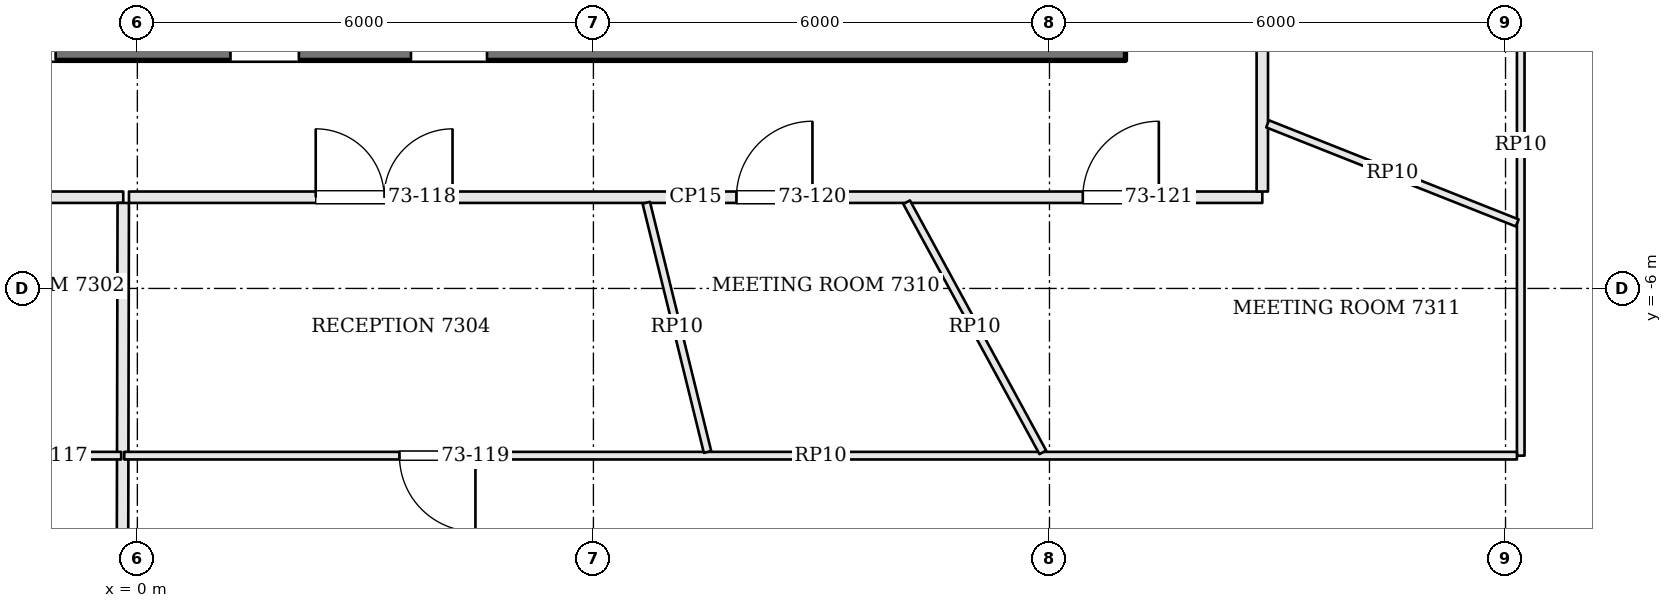
"""IFC4 building model, lengths in metres.
Left out: names, types, materials, properties, quantities, classifications, styles, units other than length and angle.
Written with IfcOpenShell. Run it as: python <this file> out.ifc"""

import sys

from ifc_helpers import new_model, si_unit, direction, frame, frame_2d, origin, place, context, subcontext, project, spatial, rectangle, extrude, element, fill, save


model = new_model("IFC4")
c1 = context("Model", 3, precision=1e-05, world=origin(), true_north=direction((0.0, 1.0)))
c2 = subcontext(c1, "Body", "Model", "MODEL_VIEW")
j1 = project(units=[si_unit("LENGTHUNIT", "METRE"), si_unit("PLANEANGLEUNIT", "RADIAN")], contexts=[c1])
p1 = place(None, origin())
s1 = spatial("IfcSite", under=j1, at=p1, CompositionType="ELEMENT")
p2 = place(p1, origin())
s2 = spatial("IfcBuilding", under=s1, at=p2, CompositionType="ELEMENT")
p3 = place(p2, frame((0.0, 0.0, 296.1)))
s3 = spatial("IfcBuildingStorey", under=s2, at=p3, CompositionType="ELEMENT", Elevation=296.1)
p4 = place(p3, frame((-13.0, -2.6, 0.0), z_axis=(0.0, 0.0, 1.0), x_axis=(1.0, 0.0, 0.0)))
e1 = element("IfcWall", 1, at=p4, inside=s3, PredefinedType="SHEAR", context=c2, shape_type="SweptSolid", body=[
    extrude(rectangle(XDim=26.0, YDim=0.8, at=frame_2d((13.0, 0.0))), origin(), (0.0, 0.0, 1.0), 3.9),
])
p5 = place(p4, frame((8.5, 0.0, 0.0)))
e2 = element("IfcOpeningElement", 2, at=p5, cuts=e1, PredefinedType="OPENING", context=c2, shape_type="SweptSolid", body=[
    extrude(rectangle(XDim=1.0, YDim=2.1, at=frame_2d((0.5, 1.05))), frame((0.0, 0.41, 0.0), z_axis=(0.0, -1.0, 0.0), x_axis=(1.0, 0.0, 0.0)), (0.0, 0.0, 1.0), 0.82),
])
p6 = place(p4, frame((11.025, 0.0, 0.0)))
e3 = element("IfcOpeningElement", 3, at=p6, cuts=e1, PredefinedType="OPENING", context=c2, shape_type="SweptSolid", body=[
    extrude(rectangle(XDim=0.9, YDim=2.1, at=frame_2d((0.45, 1.05))), frame((0.0, 0.41, 0.0), z_axis=(0.0, -1.0, 0.0), x_axis=(1.0, 0.0, 0.0)), (0.0, 0.0, 1.0), 0.82),
])
p7 = place(p4, frame((14.225, 0.0, 0.0)))
e4 = element("IfcOpeningElement", 4, at=p7, cuts=e1, PredefinedType="OPENING", context=c2, shape_type="SweptSolid", body=[
    extrude(rectangle(XDim=0.9, YDim=2.1, at=frame_2d((0.45, 1.05))), frame((0.0, 0.41, 0.0), z_axis=(0.0, -1.0, 0.0), x_axis=(1.0, 0.0, 0.0)), (0.0, 0.0, 1.0), 0.82),
])
p8 = place(p4, frame((16.6, 0.0, 0.0)))
e5 = element("IfcOpeningElement", 5, at=p8, cuts=e1, PredefinedType="OPENING", context=c2, shape_type="SweptSolid", body=[
    extrude(rectangle(XDim=1.0, YDim=2.1, at=frame_2d((0.5, 1.05))), frame((0.0, 0.41, 0.0), z_axis=(0.0, -1.0, 0.0), x_axis=(1.0, 0.0, 0.0)), (0.0, 0.0, 1.0), 0.82),
])
p9 = place(p3, frame((-14.725, -4.8, 0.0), z_axis=(0.0, 0.0, 1.0), x_axis=(1.0, 0.0, 0.0)))
e6 = element("IfcWall", 6, at=p9, inside=s3, PredefinedType="PARTITIONING", context=c2, shape_type="SweptSolid", body=[
    extrude(rectangle(XDim=14.54, YDim=0.15, at=frame_2d((7.27, 0.0))), origin(), (0.0, 0.0, 1.0), 3.198),
])
p10 = place(p9, frame((0.45, 0.0, 0.0)))
e7 = element("IfcOpeningElement", 7, at=p10, cuts=e6, PredefinedType="OPENING", context=c2, shape_type="SweptSolid", body=[
    extrude(rectangle(XDim=1.0, YDim=2.4, at=frame_2d((0.5, 1.2))), frame((0.0, 0.085, 0.0), z_axis=(0.0, -1.0, 0.0), x_axis=(1.0, 0.0, 0.0)), (0.0, 0.0, 1.0), 0.17),
])
p11 = place(p9, frame((3.423, 0.0, 0.0)))
e8 = element("IfcOpeningElement", 8, at=p11, cuts=e6, PredefinedType="OPENING", context=c2, shape_type="SweptSolid", body=[
    extrude(rectangle(XDim=1.0, YDim=2.4, at=frame_2d((0.5, 1.2))), frame((0.0, 0.085, 0.0), z_axis=(0.0, -1.0, 0.0), x_axis=(1.0, 0.0, 0.0)), (0.0, 0.0, 1.0), 0.17),
])
p12 = place(p9, frame((6.014, 0.0, 0.0)))
e9 = element("IfcOpeningElement", 9, at=p12, cuts=e6, PredefinedType="OPENING", context=c2, shape_type="SweptSolid", body=[
    extrude(rectangle(XDim=1.0, YDim=2.4, at=frame_2d((0.5, 1.2))), frame((0.0, 0.085, 0.0), z_axis=(0.0, -1.0, 0.0), x_axis=(1.0, 0.0, 0.0)), (0.0, 0.0, 1.0), 0.17),
])
p13 = place(p3, frame((-0.213, -17.994, 0.0), z_axis=(0.0, 0.0, 1.0), x_axis=(0.002121478031, 0.999997749663, 0.0)))
e10 = element("IfcWall", 10, at=p13, inside=s3, PredefinedType="PARTITIONING", context=c2, shape_type="SweptSolid", body=[
    extrude(rectangle(XDim=13.119, YDim=0.15, at=frame_2d((6.56, 0.0))), origin(), (0.0, 0.0, 1.0), 3.234),
])
p14 = place(p3, frame((-0.11, -4.8, 0.0), z_axis=(0.0, 0.0, 1.0), x_axis=(1.0, 0.0, 0.0)))
e11 = element("IfcWall", 11, at=p14, inside=s3, PredefinedType="PARTITIONING", context=c2, shape_type="SweptSolid", body=[
    extrude(rectangle(XDim=14.91, YDim=0.15, at=frame_2d((7.455, 0.0))), origin(), (0.0, 0.0, 1.0), 3.198),
])
p15 = place(p14, frame((2.457, 0.0, 0.0)))
e12 = element("IfcOpeningElement", 12, at=p15, cuts=e11, PredefinedType="OPENING", context=c2, shape_type="SweptSolid", body=[
    extrude(rectangle(XDim=1.8, YDim=2.1, at=frame_2d((0.9, 1.05))), frame((0.0, 0.085, 0.0), z_axis=(0.0, -1.0, 0.0), x_axis=(1.0, 0.0, 0.0)), (0.0, 0.0, 1.0), 0.17),
])
p16 = place(p14, frame((7.992, 0.0, 0.0)))
e13 = element("IfcOpeningElement", 13, at=p16, cuts=e11, PredefinedType="OPENING", context=c2, shape_type="SweptSolid", body=[
    extrude(rectangle(XDim=1.0, YDim=2.4, at=frame_2d((0.5, 1.2))), frame((0.0, 0.085, 0.0), z_axis=(0.0, -1.0, 0.0), x_axis=(1.0, 0.0, 0.0)), (0.0, 0.0, 1.0), 0.17),
])
p17 = place(p14, frame((12.549, 0.0, 0.0)))
e14 = element("IfcOpeningElement", 14, at=p17, cuts=e11, PredefinedType="OPENING", context=c2, shape_type="SweptSolid", body=[
    extrude(rectangle(XDim=1.0, YDim=2.4, at=frame_2d((0.5, 1.2))), frame((0.0, 0.085, 0.0), z_axis=(0.0, -1.0, 0.0), x_axis=(1.0, 0.0, 0.0)), (0.0, 0.0, 1.0), 0.17),
])
p18 = place(p3, frame((14.8, -4.725, 0.0), z_axis=(0.0, 0.0, 1.0), x_axis=(0.0, 1.0, 0.0)))
e15 = element("IfcWall", 15, at=p18, inside=s3, PredefinedType="PARTITIONING", context=c2, shape_type="SweptSolid", body=[
    extrude(rectangle(XDim=4.698, YDim=0.15, at=frame_2d((2.349, 0.0))), origin(), (0.0, 0.0, 1.0), 3.198),
])
p19 = place(p3, frame((-0.213, -8.2, 0.0), z_axis=(0.0, 0.0, 1.0), x_axis=(-1.0, 0.0, 0.0)))
e16 = element("IfcWall", 16, at=p19, inside=s3, PredefinedType="PARTITIONING", context=c2, shape_type="SweptSolid", body=[
    extrude(rectangle(XDim=17.937, YDim=0.1, at=frame_2d((8.969, 0.0))), origin(), (0.0, 0.0, 1.0), 3.184),
])
p20 = place(p19, frame((4.931, 0.0, 0.0)))
e17 = element("IfcOpeningElement", 17, at=p20, cuts=e16, PredefinedType="OPENING", context=c2, shape_type="SweptSolid", body=[
    extrude(rectangle(XDim=0.9, YDim=2.1, at=frame_2d((0.45, 1.05))), frame((0.0, 0.06, 0.0), z_axis=(0.0, -1.0, 0.0), x_axis=(1.0, 0.0, 0.0)), (0.0, 0.0, 1.0), 0.12),
])
p21 = place(p19, frame((0.938, 0.0, 0.0)))
e18 = element("IfcOpeningElement", 18, at=p21, cuts=e16, PredefinedType="OPENING", context=c2, shape_type="SweptSolid", body=[
    extrude(rectangle(XDim=0.9, YDim=2.1, at=frame_2d((0.45, 1.05))), frame((0.0, 0.06, 0.0), z_axis=(0.0, -1.0, 0.0), x_axis=(1.0, 0.0, 0.0)), (0.0, 0.0, 1.0), 0.12),
])
p22 = place(p3, frame((18.2, -0.029, 0.0), z_axis=(0.0, 0.0, 1.0), x_axis=(0.0, -1.0, 0.0)))
e19 = element("IfcWall", 19, at=p22, inside=s3, PredefinedType="PARTITIONING", context=c2, shape_type="SweptSolid", body=[
    extrude(rectangle(XDim=8.171, YDim=0.1, at=frame_2d((4.085, 0.0))), origin(), (0.0, 0.0, 1.0), 3.184),
])
p23 = place(p22, frame((1.824, 0.0, 0.0)))
e20 = element("IfcOpeningElement", 20, at=p23, cuts=e19, PredefinedType="OPENING", context=c2, shape_type="SweptSolid", body=[
    extrude(rectangle(XDim=0.9, YDim=2.1, at=frame_2d((0.45, 1.05))), frame((0.0, 0.06, 0.0), z_axis=(0.0, -1.0, 0.0), x_axis=(1.0, 0.0, 0.0)), (0.0, 0.0, 1.0), 0.12),
])
p24 = place(p3, frame((18.15, -8.2, 0.0), z_axis=(0.0, 0.0, 1.0), x_axis=(-1.0, 0.0, 0.0)))
e21 = element("IfcWall", 21, at=p24, inside=s3, PredefinedType="PARTITIONING", context=c2, shape_type="SweptSolid", body=[
    extrude(rectangle(XDim=18.323, YDim=0.1, at=frame_2d((9.161, 0.0))), origin(), (0.0, 0.0, 1.0), 3.184),
])
p25 = place(p24, frame((13.702, 0.0, 0.0)))
e22 = element("IfcOpeningElement", 22, at=p25, cuts=e21, PredefinedType="OPENING", context=c2, shape_type="SweptSolid", body=[
    extrude(rectangle(XDim=1.0, YDim=2.1, at=frame_2d((0.5, 1.05))), frame((0.0, 0.06, 0.0), z_axis=(0.0, -1.0, 0.0), x_axis=(1.0, 0.0, 0.0)), (0.0, 0.0, 1.0), 0.12),
])
p26 = place(p3, frame((6.695, -4.873, 0.0), z_axis=(0.0, 0.0, 1.0), x_axis=(0.23877358923, -0.971075266437, 0.0)))
e23 = element("IfcWall", 23, at=p26, inside=s3, PredefinedType="PARTITIONING", context=c2, shape_type="SweptSolid", body=[
    extrude(rectangle(XDim=3.376, YDim=0.1, at=frame_2d((1.688, 0.0))), origin(), (0.0, 0.0, 1.0), 3.184),
])
p27 = place(p3, frame((10.121, -4.866, 0.0), z_axis=(0.0, 0.0, 1.0), x_axis=(0.478272150454, -0.878211677274, 0.0)))
e24 = element("IfcWall", 24, at=p27, inside=s3, PredefinedType="PARTITIONING", context=c2, shape_type="SweptSolid", body=[
    extrude(rectangle(XDim=3.746, YDim=0.1, at=frame_2d((1.873, 0.0))), origin(), (0.0, 0.0, 1.0), 3.184),
])
p28 = place(p3, frame((14.87, -3.835, 0.0), z_axis=(0.0, 0.0, 1.0), x_axis=(0.9294835662, -0.368863525119, 0.0)))
e25 = element("IfcWall", 25, at=p28, inside=s3, PredefinedType="PARTITIONING", context=c2, shape_type="SweptSolid", body=[
    extrude(rectangle(XDim=3.533, YDim=0.1, at=frame_2d((1.767, 0.0))), origin(), (0.0, 0.0, 1.0), 3.184),
])
p29 = place(p15, origin())
e26 = element("IfcDoor", 26, at=p29, inside=s3, OperationType="DOUBLE_DOOR_SINGLE_SWING", PredefinedType="DOOR", context=c2, shape_type="SweptSolid", body=[
    extrude(rectangle(XDim=1.8, YDim=2.1, at=frame_2d((0.9, 1.05))), frame((0.0, 0.025, 0.0), z_axis=(0.0, -1.0, 0.0), x_axis=(1.0, 0.0, 0.0)), (0.0, 0.0, 1.0), 0.05),
])
fill(e12, e26)
p30 = place(p25, origin())
e27 = element("IfcDoor", 27, at=p30, inside=s3, OperationType="SINGLE_SWING_LEFT", PredefinedType="DOOR", context=c2, shape_type="SweptSolid", body=[
    extrude(rectangle(XDim=1.0, YDim=2.1, at=frame_2d((0.5, 1.05))), frame((0.0, 0.025, 0.0), z_axis=(0.0, -1.0, 0.0), x_axis=(1.0, 0.0, 0.0)), (0.0, 0.0, 1.0), 0.05),
])
fill(e22, e27)
p31 = place(p16, origin())
e28 = element("IfcDoor", 28, at=p31, inside=s3, OperationType="SINGLE_SWING_RIGHT", PredefinedType="DOOR", context=c2, shape_type="SweptSolid", body=[
    extrude(rectangle(XDim=1.0, YDim=2.4, at=frame_2d((0.5, 1.2))), frame((0.0, 0.025, 0.0), z_axis=(0.0, -1.0, 0.0), x_axis=(1.0, 0.0, 0.0)), (0.0, 0.0, 1.0), 0.05),
])
fill(e13, e28)
p32 = place(p17, origin())
e29 = element("IfcDoor", 29, at=p32, inside=s3, OperationType="SINGLE_SWING_RIGHT", PredefinedType="DOOR", context=c2, shape_type="SweptSolid", body=[
    extrude(rectangle(XDim=1.0, YDim=2.4, at=frame_2d((0.5, 1.2))), frame((0.0, 0.025, 0.0), z_axis=(0.0, -1.0, 0.0), x_axis=(1.0, 0.0, 0.0)), (0.0, 0.0, 1.0), 0.05),
])
fill(e14, e29)
save(model, sys.argv[1])
